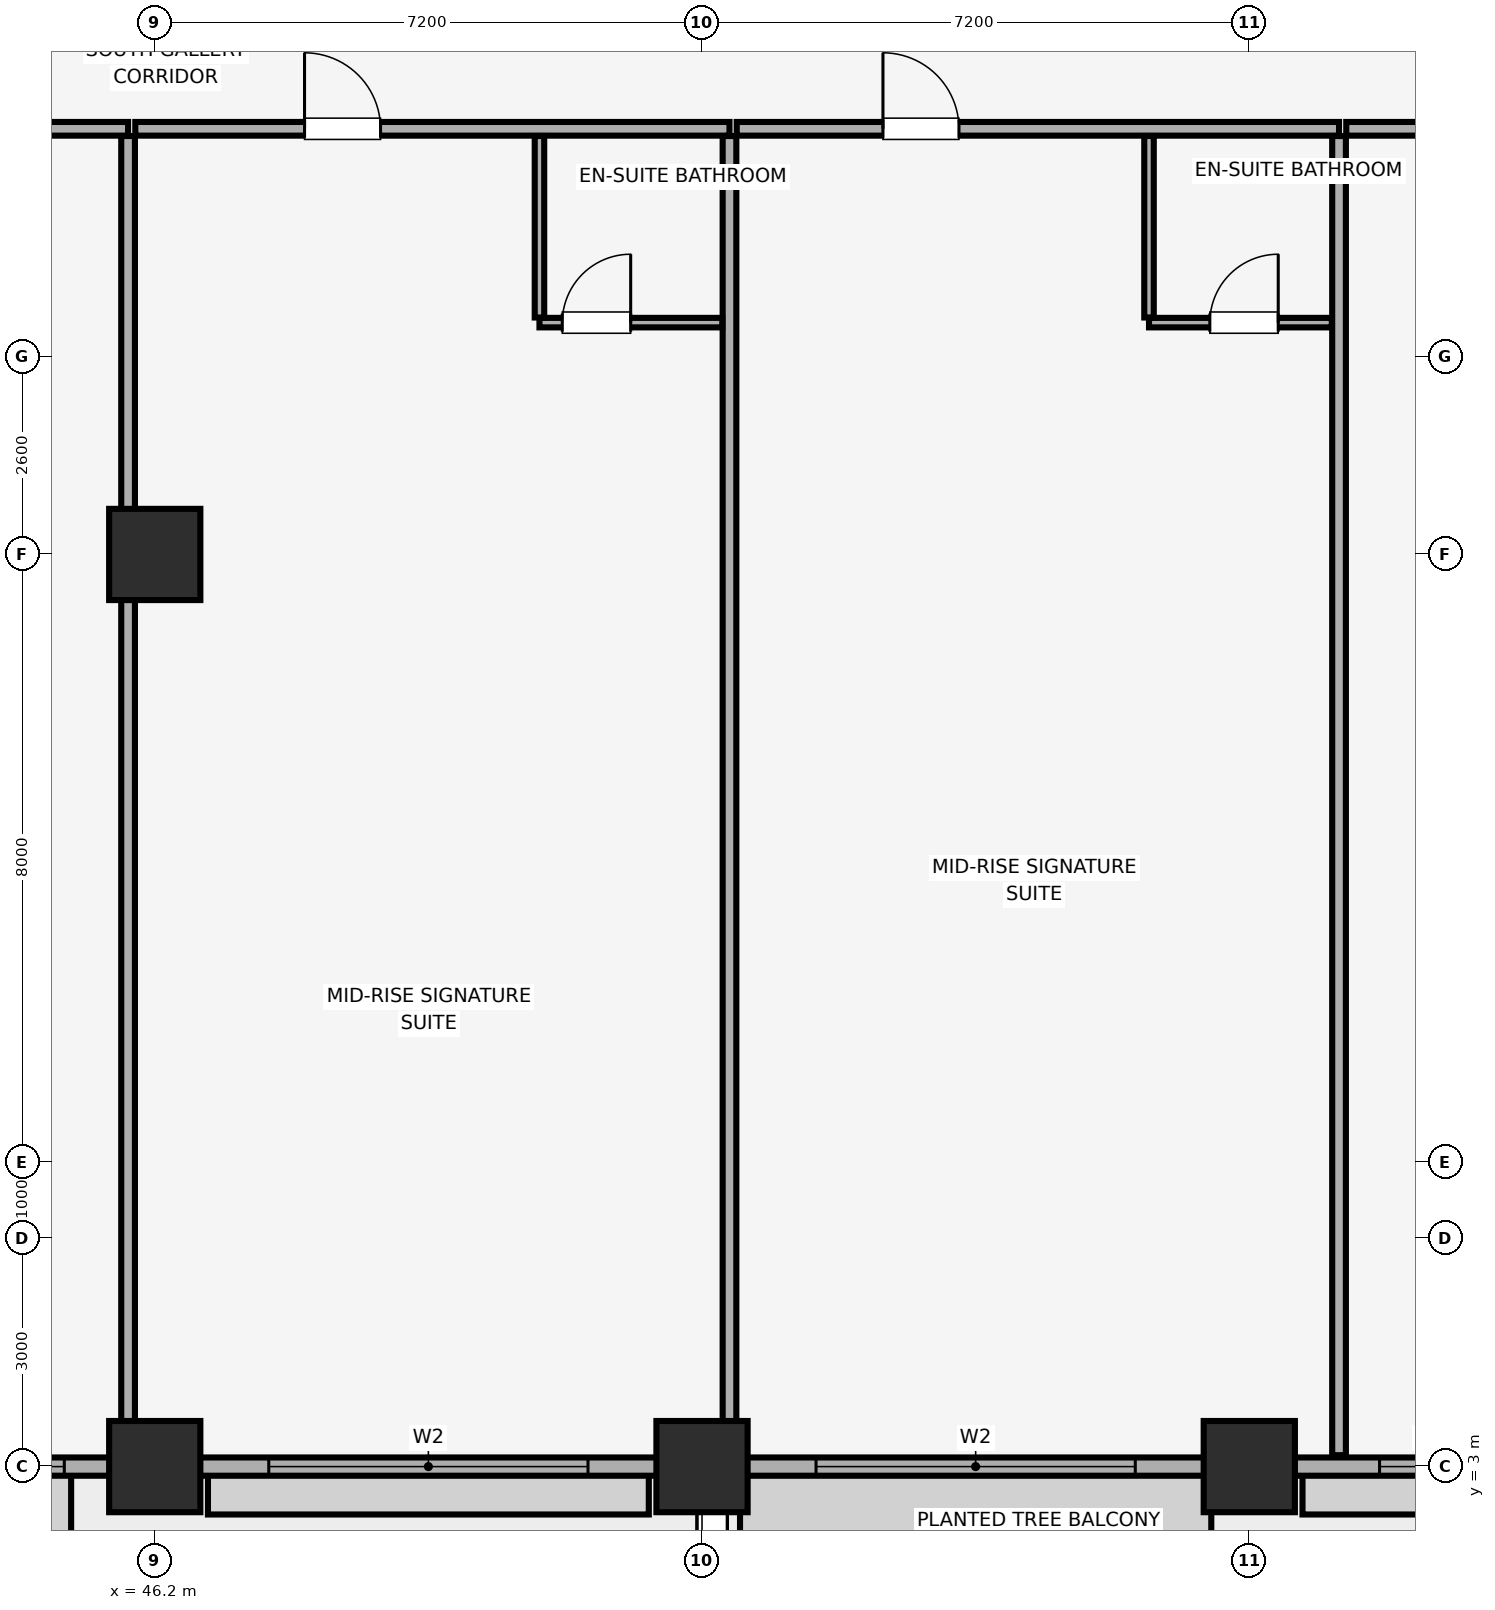
"""IFC4 building model, lengths in metres.
Left out: names, types, materials, properties, quantities, classifications, styles, units other than length and angle.
Written with IfcOpenShell. Run it as: python <this file> out.ifc"""

import sys

from ifc_helpers import new_model, si_unit, direction, frame, frame_2d, origin, origin_2d, place, context, subcontext, project, spatial, rectangle, extrude, element, fill, save


model = new_model("IFC4")
c1 = context("Model", 3, precision=1e-05, world=origin(), true_north=direction((0.0, 1.0)))
c2 = subcontext(c1, "Body", "Model", "MODEL_VIEW")
j1 = project(units=[si_unit("LENGTHUNIT", "METRE"), si_unit("PLANEANGLEUNIT", "RADIAN")], contexts=[c1])
p1 = place(None, origin())
s1 = spatial("IfcSite", under=j1, at=p1, CompositionType="ELEMENT")
p2 = place(p1, origin())
s2 = spatial("IfcBuilding", under=s1, at=p2, CompositionType="ELEMENT")
p3 = place(p2, frame((0.0, 0.0, 180.95)))
s3 = spatial("IfcBuildingStorey", under=s2, at=p3, CompositionType="ELEMENT", Elevation=180.95)
for number, where, z_axis, x_axis in (
    (1, (46.2, 3.0, 0.0), (0.0, 0.0, 1.0), (1.0, 0.0, 0.0)),
    (2, (53.4, 3.0, 0.0), (0.0, 0.0, 1.0), (1.0, 0.0, 0.0)),
    (3, (60.6, 3.0, 0.0), (0.0, 0.0, 1.0), (1.0, 0.0, 0.0)),
    (4, (46.2, 15.0, 0.0), (0.0, 0.0, 1.0), (1.0, 0.0, 0.0)),
):
    element("IfcColumn", number, at=place(p3, frame(where, z_axis=z_axis, x_axis=x_axis)), inside=s3, PredefinedType="COLUMN", context=c2, shape_type="SweptSolid", body=[
        extrude(rectangle(XDim=1.2, YDim=1.2, at=origin_2d()), origin(), (0.0, 0.0, 1.0), 3.45),
    ])
p4 = place(p3, frame((7.0, 3.0, 0.0), z_axis=(0.0, 0.0, 1.0), x_axis=(1.0, 0.0, 0.0)))
e5 = element("IfcWall", 5, at=p4, inside=s3, PredefinedType="SOLIDWALL", context=c2, shape_type="SweptSolid", body=[
    extrude(rectangle(XDim=70.0, YDim=0.24, at=frame_2d((35.0, 0.0))), origin(), (0.0, 0.0, 1.0), 2.65),
])
p5 = place(p4, frame((11.383, 0.0, 0.0)))
e6 = element("IfcOpeningElement", 6, at=p5, cuts=e5, PredefinedType="OPENING", context=c2, shape_type="SweptSolid", body=[
    extrude(rectangle(XDim=1.1, YDim=2.15, at=frame_2d((0.55, 1.075))), frame((0.0, 0.13, 0.0), z_axis=(0.0, -1.0, 0.0), x_axis=(1.0, 0.0, 0.0)), (0.0, 0.0, 1.0), 0.26),
])
p6 = place(p4, frame((34.45, 0.0, 0.0)))
e7 = element("IfcOpeningElement", 7, at=p6, cuts=e5, PredefinedType="OPENING", context=c2, shape_type="SweptSolid", body=[
    extrude(rectangle(XDim=1.1, YDim=2.15, at=frame_2d((0.55, 1.075))), frame((0.0, 0.13, 0.0), z_axis=(0.0, -1.0, 0.0), x_axis=(1.0, 0.0, 0.0)), (0.0, 0.0, 1.0), 0.26),
])
p7 = place(p4, frame((57.517, 0.0, 0.0)))
e8 = element("IfcOpeningElement", 8, at=p7, cuts=e5, PredefinedType="OPENING", context=c2, shape_type="SweptSolid", body=[
    extrude(rectangle(XDim=1.1, YDim=2.15, at=frame_2d((0.55, 1.075))), frame((0.0, 0.13, 0.0), z_axis=(0.0, -1.0, 0.0), x_axis=(1.0, 0.0, 0.0)), (0.0, 0.0, 1.0), 0.26),
])
p8 = place(p4, frame((5.2, 0.0, 0.85)))
e9 = element("IfcOpeningElement", 9, at=p8, cuts=e5, PredefinedType="OPENING", context=c2, shape_type="SweptSolid", body=[
    extrude(rectangle(XDim=1.5, YDim=1.4, at=frame_2d((0.75, 0.7))), frame((0.0, 0.13, 0.0), z_axis=(0.0, -1.0, 0.0), x_axis=(1.0, 0.0, 0.0)), (0.0, 0.0, 1.0), 0.26),
])
p9 = place(p4, frame((13.133, 0.0, 0.85)))
e10 = element("IfcOpeningElement", 10, at=p9, cuts=e5, PredefinedType="OPENING", context=c2, shape_type="SweptSolid", body=[
    extrude(rectangle(XDim=1.5, YDim=1.4, at=frame_2d((0.75, 0.7))), frame((0.0, 0.13, 0.0), z_axis=(0.0, -1.0, 0.0), x_axis=(1.0, 0.0, 0.0)), (0.0, 0.0, 1.0), 0.26),
])
p10 = place(p4, frame((17.812, 0.0, 0.85)))
e11 = element("IfcOpeningElement", 11, at=p10, cuts=e5, PredefinedType="OPENING", context=c2, shape_type="SweptSolid", body=[
    extrude(rectangle(XDim=4.2, YDim=1.65, at=frame_2d((2.1, 0.825))), frame((0.0, 0.13, 0.0), z_axis=(0.0, -1.0, 0.0), x_axis=(1.0, 0.0, 0.0)), (0.0, 0.0, 1.0), 0.26),
])
p11 = place(p4, frame((25.1, 0.0, 0.85)))
e12 = element("IfcOpeningElement", 12, at=p11, cuts=e5, PredefinedType="OPENING", context=c2, shape_type="SweptSolid", body=[
    extrude(rectangle(XDim=4.2, YDim=1.65, at=frame_2d((2.1, 0.825))), frame((0.0, 0.13, 0.0), z_axis=(0.0, -1.0, 0.0), x_axis=(1.0, 0.0, 0.0)), (0.0, 0.0, 1.0), 0.26),
])
p12 = place(p4, frame((31.99, 0.0, 0.85)))
e13 = element("IfcOpeningElement", 13, at=p12, cuts=e5, PredefinedType="OPENING", context=c2, shape_type="SweptSolid", body=[
    extrude(rectangle(XDim=1.5, YDim=1.4, at=frame_2d((0.75, 0.7))), frame((0.0, 0.13, 0.0), z_axis=(0.0, -1.0, 0.0), x_axis=(1.0, 0.0, 0.0)), (0.0, 0.0, 1.0), 0.26),
])
p13 = place(p4, frame((36.51, 0.0, 0.85)))
e14 = element("IfcOpeningElement", 14, at=p13, cuts=e5, PredefinedType="OPENING", context=c2, shape_type="SweptSolid", body=[
    extrude(rectangle(XDim=1.5, YDim=1.4, at=frame_2d((0.75, 0.7))), frame((0.0, 0.13, 0.0), z_axis=(0.0, -1.0, 0.0), x_axis=(1.0, 0.0, 0.0)), (0.0, 0.0, 1.0), 0.26),
])
p14 = place(p4, frame((40.7, 0.0, 0.85)))
e15 = element("IfcOpeningElement", 15, at=p14, cuts=e5, PredefinedType="OPENING", context=c2, shape_type="SweptSolid", body=[
    extrude(rectangle(XDim=4.2, YDim=1.65, at=frame_2d((2.1, 0.825))), frame((0.0, 0.13, 0.0), z_axis=(0.0, -1.0, 0.0), x_axis=(1.0, 0.0, 0.0)), (0.0, 0.0, 1.0), 0.26),
])
p15 = place(p4, frame((47.9, 0.0, 0.85)))
e16 = element("IfcOpeningElement", 16, at=p15, cuts=e5, PredefinedType="OPENING", context=c2, shape_type="SweptSolid", body=[
    extrude(rectangle(XDim=4.2, YDim=1.65, at=frame_2d((2.1, 0.825))), frame((0.0, 0.13, 0.0), z_axis=(0.0, -1.0, 0.0), x_axis=(1.0, 0.0, 0.0)), (0.0, 0.0, 1.0), 0.26),
])
p16 = place(p4, frame((55.314, 0.0, 0.85)))
e17 = element("IfcOpeningElement", 17, at=p16, cuts=e5, PredefinedType="OPENING", context=c2, shape_type="SweptSolid", body=[
    extrude(rectangle(XDim=1.5, YDim=1.4, at=frame_2d((0.75, 0.7))), frame((0.0, 0.13, 0.0), z_axis=(0.0, -1.0, 0.0), x_axis=(1.0, 0.0, 0.0)), (0.0, 0.0, 1.0), 0.26),
])
p17 = place(p4, frame((63.3, 0.0, 0.85)))
e18 = element("IfcOpeningElement", 18, at=p17, cuts=e5, PredefinedType="OPENING", context=c2, shape_type="SweptSolid", body=[
    extrude(rectangle(XDim=1.5, YDim=1.4, at=frame_2d((0.75, 0.7))), frame((0.0, 0.13, 0.0), z_axis=(0.0, -1.0, 0.0), x_axis=(1.0, 0.0, 0.0)), (0.0, 0.0, 1.0), 0.26),
])
p18 = place(p3, frame((38.032, 20.6, 0.0), z_axis=(0.0, 0.0, 1.0), x_axis=(1.0, 0.0, 0.0)))
e19 = element("IfcWall", 19, at=p18, inside=s3, PredefinedType="PARTITIONING", context=c2, shape_type="SweptSolid", body=[
    extrude(rectangle(XDim=7.817, YDim=0.18, at=frame_2d((3.909, 0.0))), origin(), (0.0, 0.0, 1.0), 3.45),
])
p19 = place(p18, frame((4.847, 0.0, 0.0)))
e20 = element("IfcOpeningElement", 20, at=p19, cuts=e19, PredefinedType="OPENING", context=c2, shape_type="SweptSolid", body=[
    extrude(rectangle(XDim=1.0, YDim=2.15, at=frame_2d((0.5, 1.075))), frame((0.0, 0.1, 0.0), z_axis=(0.0, -1.0, 0.0), x_axis=(1.0, 0.0, 0.0)), (0.0, 0.0, 1.0), 0.2),
])
p20 = place(p3, frame((45.849, 3.15, 0.0), z_axis=(0.0, 0.0, 1.0), x_axis=(0.0, 1.0, 0.0)))
e21 = element("IfcWall", 21, at=p20, inside=s3, PredefinedType="PARTITIONING", context=c2, shape_type="SweptSolid", body=[
    extrude(rectangle(XDim=17.355, YDim=0.18, at=frame_2d((8.677, 0.0))), origin(), (0.0, 0.0, 1.0), 3.45),
])
p21 = place(p3, frame((45.944, 20.6, 0.0), z_axis=(0.0, 0.0, 1.0), x_axis=(1.0, 0.0, 0.0)))
e22 = element("IfcWall", 22, at=p21, inside=s3, PredefinedType="PARTITIONING", context=c2, shape_type="SweptSolid", body=[
    extrude(rectangle(XDim=7.817, YDim=0.18, at=frame_2d((3.909, 0.0))), origin(), (0.0, 0.0, 1.0), 3.45),
])
p22 = place(p21, frame((2.227, 0.0, 0.0)))
e23 = element("IfcOpeningElement", 23, at=p22, cuts=e22, PredefinedType="OPENING", context=c2, shape_type="SweptSolid", body=[
    extrude(rectangle(XDim=1.0, YDim=2.15, at=frame_2d((0.5, 1.075))), frame((0.0, 0.1, 0.0), z_axis=(0.0, -1.0, 0.0), x_axis=(1.0, 0.0, 0.0)), (0.0, 0.0, 1.0), 0.2),
])
p23 = place(p3, frame((53.761, 3.15, 0.0), z_axis=(0.0, 0.0, 1.0), x_axis=(0.0, 1.0, 0.0)))
e24 = element("IfcWall", 24, at=p23, inside=s3, PredefinedType="PARTITIONING", context=c2, shape_type="SweptSolid", body=[
    extrude(rectangle(XDim=17.355, YDim=0.18, at=frame_2d((8.677, 0.0))), origin(), (0.0, 0.0, 1.0), 3.45),
])
p24 = place(p3, frame((51.261, 18.05, 0.0), z_axis=(0.0, 0.0, 1.0), x_axis=(1.0, 0.0, 0.0)))
e25 = element("IfcWall", 25, at=p24, inside=s3, PredefinedType="PARTITIONING", context=c2, shape_type="SweptSolid", body=[
    extrude(rectangle(XDim=2.405, YDim=0.125, at=frame_2d((1.203, 0.0))), origin(), (0.0, 0.0, 1.0), 3.45),
])
p25 = place(p24, frame((0.3, 0.0, 0.0)))
e26 = element("IfcOpeningElement", 26, at=p25, cuts=e25, PredefinedType="OPENING", context=c2, shape_type="SweptSolid", body=[
    extrude(rectangle(XDim=0.9, YDim=2.1, at=frame_2d((0.45, 1.05))), frame((0.0, 0.073, 0.0), z_axis=(0.0, -1.0, 0.0), x_axis=(1.0, 0.0, 0.0)), (0.0, 0.0, 1.0), 0.145),
])
p26 = place(p3, frame((51.261, 18.117, 0.0), z_axis=(0.0, 0.0, 1.0), x_axis=(0.0, 1.0, 0.0)))
e27 = element("IfcWall", 27, at=p26, inside=s3, PredefinedType="PARTITIONING", context=c2, shape_type="SweptSolid", body=[
    extrude(rectangle(XDim=2.387, YDim=0.125, at=frame_2d((1.194, 0.0))), origin(), (0.0, 0.0, 1.0), 3.45),
])
p27 = place(p3, frame((53.856, 20.6, 0.0), z_axis=(0.0, 0.0, 1.0), x_axis=(1.0, 0.0, 0.0)))
e28 = element("IfcWall", 28, at=p27, inside=s3, PredefinedType="PARTITIONING", context=c2, shape_type="SweptSolid", body=[
    extrude(rectangle(XDim=7.924, YDim=0.18, at=frame_2d((3.962, 0.0))), origin(), (0.0, 0.0, 1.0), 3.45),
])
p28 = place(p27, frame((1.924, 0.0, 0.0)))
e29 = element("IfcOpeningElement", 29, at=p28, cuts=e28, PredefinedType="OPENING", context=c2, shape_type="SweptSolid", body=[
    extrude(rectangle(XDim=1.0, YDim=2.15, at=frame_2d((0.5, 1.075))), frame((0.0, 0.1, 0.0), z_axis=(0.0, -1.0, 0.0), x_axis=(1.0, 0.0, 0.0)), (0.0, 0.0, 1.0), 0.2),
])
p29 = place(p3, frame((61.781, 3.15, 0.0), z_axis=(0.0, 0.0, 1.0), x_axis=(0.0, 1.0, 0.0)))
e30 = element("IfcWall", 30, at=p29, inside=s3, PredefinedType="PARTITIONING", context=c2, shape_type="SweptSolid", body=[
    extrude(rectangle(XDim=17.355, YDim=0.18, at=frame_2d((8.677, 0.0))), origin(), (0.0, 0.0, 1.0), 3.45),
])
p30 = place(p3, frame((59.281, 18.05, 0.0), z_axis=(0.0, 0.0, 1.0), x_axis=(1.0, 0.0, 0.0)))
e31 = element("IfcWall", 31, at=p30, inside=s3, PredefinedType="PARTITIONING", context=c2, shape_type="SweptSolid", body=[
    extrude(rectangle(XDim=2.405, YDim=0.125, at=frame_2d((1.203, 0.0))), origin(), (0.0, 0.0, 1.0), 3.45),
])
p31 = place(p30, frame((0.8, 0.0, 0.0)))
e32 = element("IfcOpeningElement", 32, at=p31, cuts=e31, PredefinedType="OPENING", context=c2, shape_type="SweptSolid", body=[
    extrude(rectangle(XDim=0.9, YDim=2.1, at=frame_2d((0.45, 1.05))), frame((0.0, 0.073, 0.0), z_axis=(0.0, -1.0, 0.0), x_axis=(1.0, 0.0, 0.0)), (0.0, 0.0, 1.0), 0.145),
])
p32 = place(p3, frame((59.281, 18.117, 0.0), z_axis=(0.0, 0.0, 1.0), x_axis=(0.0, 1.0, 0.0)))
e33 = element("IfcWall", 33, at=p32, inside=s3, PredefinedType="PARTITIONING", context=c2, shape_type="SweptSolid", body=[
    extrude(rectangle(XDim=2.387, YDim=0.125, at=frame_2d((1.194, 0.0))), origin(), (0.0, 0.0, 1.0), 3.45),
])
p33 = place(p3, frame((61.876, 20.6, 0.0), z_axis=(0.0, 0.0, 1.0), x_axis=(1.0, 0.0, 0.0)))
e34 = element("IfcWall", 34, at=p33, inside=s3, PredefinedType="PARTITIONING", context=c2, shape_type="SweptSolid", body=[
    extrude(rectangle(XDim=7.924, YDim=0.18, at=frame_2d((3.962, 0.0))), origin(), (0.0, 0.0, 1.0), 3.45),
])
p34 = place(p33, frame((1.715, 0.0, 0.0)))
e35 = element("IfcOpeningElement", 35, at=p34, cuts=e34, PredefinedType="OPENING", context=c2, shape_type="SweptSolid", body=[
    extrude(rectangle(XDim=1.0, YDim=2.15, at=frame_2d((0.5, 1.075))), frame((0.0, 0.1, 0.0), z_axis=(0.0, -1.0, 0.0), x_axis=(1.0, 0.0, 0.0)), (0.0, 0.0, 1.0), 0.2),
])
p35 = place(p13, origin())
e36 = element("IfcWindow", 36, at=p35, inside=s3, PartitioningType="SINGLE_PANEL", PredefinedType="WINDOW", context=c2, shape_type="SweptSolid", body=[
    extrude(rectangle(XDim=1.5, YDim=1.4, at=frame_2d((0.75, 0.7))), frame((0.0, 0.03, 0.0), z_axis=(0.0, -1.0, 0.0), x_axis=(1.0, 0.0, 0.0)), (0.0, 0.0, 1.0), 0.06),
])
fill(e14, e36)
p36 = place(p14, origin())
e37 = element("IfcWindow", 37, at=p36, inside=s3, PartitioningType="SINGLE_PANEL", PredefinedType="WINDOW", context=c2, shape_type="SweptSolid", body=[
    extrude(rectangle(XDim=4.2, YDim=1.65, at=frame_2d((2.1, 0.825))), frame((0.0, 0.03, 0.0), z_axis=(0.0, -1.0, 0.0), x_axis=(1.0, 0.0, 0.0)), (0.0, 0.0, 1.0), 0.06),
])
fill(e15, e37)
p37 = place(p15, origin())
e38 = element("IfcWindow", 38, at=p37, inside=s3, PartitioningType="SINGLE_PANEL", PredefinedType="WINDOW", context=c2, shape_type="SweptSolid", body=[
    extrude(rectangle(XDim=4.2, YDim=1.65, at=frame_2d((2.1, 0.825))), frame((0.0, 0.03, 0.0), z_axis=(0.0, -1.0, 0.0), x_axis=(1.0, 0.0, 0.0)), (0.0, 0.0, 1.0), 0.06),
])
fill(e16, e38)
p38 = place(p16, origin())
e39 = element("IfcWindow", 39, at=p38, inside=s3, PartitioningType="SINGLE_PANEL", PredefinedType="WINDOW", context=c2, shape_type="SweptSolid", body=[
    extrude(rectangle(XDim=1.5, YDim=1.4, at=frame_2d((0.75, 0.7))), frame((0.0, 0.03, 0.0), z_axis=(0.0, -1.0, 0.0), x_axis=(1.0, 0.0, 0.0)), (0.0, 0.0, 1.0), 0.06),
])
fill(e17, e39)
p39 = place(p22, origin())
e40 = element("IfcDoor", 40, at=p39, inside=s3, OperationType="SINGLE_SWING_LEFT", PredefinedType="DOOR", context=c2, shape_type="SweptSolid", body=[
    extrude(rectangle(XDim=1.0, YDim=2.15, at=frame_2d((0.5, 1.075))), frame((0.0, 0.025, 0.0), z_axis=(0.0, -1.0, 0.0), x_axis=(1.0, 0.0, 0.0)), (0.0, 0.0, 1.0), 0.05),
])
fill(e23, e40)
p40 = place(p25, origin())
e41 = element("IfcDoor", 41, at=p40, inside=s3, OperationType="SINGLE_SWING_RIGHT", PredefinedType="DOOR", context=c2, shape_type="SweptSolid", body=[
    extrude(rectangle(XDim=0.9, YDim=2.1, at=frame_2d((0.45, 1.05))), frame((0.0, 0.025, 0.0), z_axis=(0.0, -1.0, 0.0), x_axis=(1.0, 0.0, 0.0)), (0.0, 0.0, 1.0), 0.05),
])
fill(e26, e41)
p41 = place(p28, origin())
e42 = element("IfcDoor", 42, at=p41, inside=s3, OperationType="SINGLE_SWING_LEFT", PredefinedType="DOOR", context=c2, shape_type="SweptSolid", body=[
    extrude(rectangle(XDim=1.0, YDim=2.15, at=frame_2d((0.5, 1.075))), frame((0.0, 0.025, 0.0), z_axis=(0.0, -1.0, 0.0), x_axis=(1.0, 0.0, 0.0)), (0.0, 0.0, 1.0), 0.05),
])
fill(e29, e42)
p42 = place(p31, origin())
e43 = element("IfcDoor", 43, at=p42, inside=s3, OperationType="SINGLE_SWING_RIGHT", PredefinedType="DOOR", context=c2, shape_type="SweptSolid", body=[
    extrude(rectangle(XDim=0.9, YDim=2.1, at=frame_2d((0.45, 1.05))), frame((0.0, 0.025, 0.0), z_axis=(0.0, -1.0, 0.0), x_axis=(1.0, 0.0, 0.0)), (0.0, 0.0, 1.0), 0.05),
])
fill(e32, e43)
save(model, sys.argv[1])
